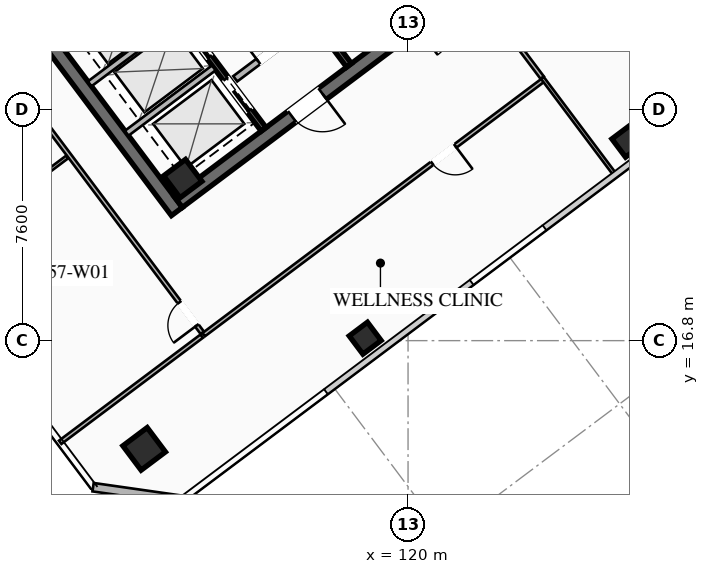
"""IFC4 building model, lengths in metres.
Left out: names, types, materials, properties, quantities, classifications, styles, units other than length and angle.
Written with IfcOpenShell. Run it as: python <this file> out.ifc"""

import sys

from ifc_helpers import new_model, si_unit, direction, frame, frame_2d, origin, origin_2d, place, context, subcontext, project, spatial, rectangle, hollow_rectangle, extrude, element, fill, save


model = new_model("IFC4")
c1 = context("Model", 3, precision=1e-05, world=origin(), true_north=direction((0.0, 1.0)))
c2 = subcontext(c1, "Body", "Model", "MODEL_VIEW")
j1 = project(units=[si_unit("LENGTHUNIT", "METRE"), si_unit("PLANEANGLEUNIT", "RADIAN")], contexts=[c1])
p1 = place(None, origin())
s1 = spatial("IfcSite", under=j1, at=p1, CompositionType="ELEMENT")
p2 = place(p1, origin())
s2 = spatial("IfcBuilding", under=s1, at=p2, CompositionType="ELEMENT")
p3 = place(p2, frame((0.0, 0.0, 211.3)))
s3 = spatial("IfcBuildingStorey", under=s2, at=p3, CompositionType="ELEMENT", Elevation=211.3)
p4 = place(p3, frame((112.396, 21.047, 0.0), z_axis=(0.0, 0.0, 1.0), x_axis=(-0.600005007985, 0.799996243986, 0.0)))
e1 = element("IfcWall", 1, at=p4, inside=s3, PredefinedType="SHEAR", context=c2, shape_type="SweptSolid", body=[
    extrude(rectangle(XDim=15.6, YDim=0.45, at=frame_2d((7.8, 0.0))), origin(), (0.0, 0.0, 1.0), 3.55),
])
p5 = place(p3, frame((124.649, 30.518, 0.0), z_axis=(0.0, 0.0, 1.0), x_axis=(-0.8, -0.6, 0.0)))
e2 = element("IfcWall", 2, at=p5, inside=s3, PredefinedType="SHEAR", context=c2, shape_type="SweptSolid", body=[
    extrude(rectangle(XDim=15.26, YDim=0.45, at=frame_2d((7.63, 0.0))), origin(), (0.0, 0.0, 1.0), 3.55),
])
p6 = place(p5, frame((9.33, 0.0, 0.0)))
e3 = element("IfcOpeningElement", 3, at=p6, cuts=e2, PredefinedType="OPENING", context=c2, shape_type="SweptSolid", body=[
    extrude(rectangle(XDim=1.25, YDim=2.25, at=frame_2d((0.625, 1.125))), frame((0.0, 0.235, 0.0), z_axis=(0.0, -1.0, 0.0), x_axis=(1.0, 0.0, 0.0)), (0.0, 0.0, 1.0), 0.47),
])
p7 = place(p5, frame((4.28, 0.0, 0.0)))
e4 = element("IfcOpeningElement", 4, at=p7, cuts=e2, PredefinedType="OPENING", context=c2, shape_type="SweptSolid", body=[
    extrude(rectangle(XDim=1.25, YDim=2.25, at=frame_2d((0.625, 1.125))), frame((0.0, 0.235, 0.0), z_axis=(0.0, -1.0, 0.0), x_axis=(1.0, 0.0, 0.0)), (0.0, 0.0, 1.0), 0.47),
])
p8 = place(p3, frame((112.59, 22.13, 0.0), z_axis=(0.0, 0.0, 1.0), x_axis=(0.799999996291, 0.600000004945, 0.0)))
e5 = element("IfcColumn", 5, at=p8, inside=s3, PredefinedType="COLUMN", context=c2, shape_type="SweptSolid", body=[
    extrude(hollow_rectangle(XDim=0.9, YDim=0.9, WallThickness=0.04, at=origin_2d()), origin(), (0.0, 0.0, 1.0), 3.37),
])
p9 = place(p3, frame((111.32, 13.24, 0.0), z_axis=(0.0, 0.0, 1.0), x_axis=(0.799999996291, 0.600000004945, 0.0)))
e6 = element("IfcColumn", 6, at=p9, inside=s3, PredefinedType="COLUMN", context=c2, shape_type="SweptSolid", body=[
    extrude(hollow_rectangle(XDim=1.0, YDim=1.0, WallThickness=0.04, at=origin_2d()), origin(), (0.0, 0.0, 1.0), 3.37),
])
for number, where, z_axis, x_axis in (
    (7, (118.59, 16.88, 0.0), (0.0, 0.0, 1.0), (0.8, 0.6, 0.0)),
    (8, (127.23, 23.36, 0.0), (0.0, 0.0, 1.0), (0.8, 0.6, 0.0)),
):
    element("IfcColumn", number, at=place(p3, frame(where, z_axis=z_axis, x_axis=x_axis)), inside=s3, PredefinedType="COLUMN", context=c2, shape_type="SweptSolid", body=[
        extrude(hollow_rectangle(XDim=0.75, YDim=0.75, WallThickness=0.032, at=origin_2d()), origin(), (0.0, 0.0, 1.0), 3.37),
    ])
p10 = place(p3, frame((112.58, 11.56, 0.0), z_axis=(0.0, 0.0, 1.0), x_axis=(-0.989954425158, 0.14138683146, 0.0)))
e9 = element("IfcWall", 9, at=p10, inside=s3, PredefinedType="SOLIDWALL", context=c2, shape_type="SweptSolid", body=[
    extrude(rectangle(XDim=2.97, YDim=0.28, at=frame_2d((1.485, 0.0))), origin(), (0.0, 0.0, 1.0), 3.37),
])
p11 = place(p3, frame((118.058, 25.856, 0.0), z_axis=(0.0, 0.0, 1.0), x_axis=(-0.600002657301, 0.799998007018, 0.0)))
e10 = element("IfcWall", 10, at=p11, inside=s3, PredefinedType="SHEAR", context=c2, shape_type="SweptSolid", body=[
    extrude(rectangle(XDim=14.7, YDim=0.2, at=frame_2d((7.35, 0.0))), origin(), (0.0, 0.0, 1.0), 3.37),
])
p12 = place(p3, frame((114.316, 25.412, 0.0), z_axis=(0.0, 0.0, 1.0), x_axis=(0.800018601094, 0.59997519774, 0.0)))
e11 = element("IfcWall", 11, at=p12, inside=s3, PredefinedType="SOLIDWALL", context=c2, shape_type="SweptSolid", body=[
    extrude(rectangle(XDim=3.15, YDim=0.22, at=frame_2d((1.575, 0.0))), origin(), (0.0, 0.0, 1.0), 2.723),
])
p13 = place(p12, frame((0.95, 0.0, 0.0)))
e12 = element("IfcOpeningElement", 12, at=p13, cuts=e11, PredefinedType="OPENING", context=c2, shape_type="SweptSolid", body=[
    extrude(rectangle(XDim=1.25, YDim=2.25, at=frame_2d((0.625, 1.125))), frame((0.0, 0.12, 0.0), z_axis=(0.0, -1.0, 0.0), x_axis=(1.0, 0.0, 0.0)), (0.0, 0.0, 1.0), 0.24),
])
p14 = place(p3, frame((115.25, 23.75, 0.0), z_axis=(0.0, 0.0, 1.0), x_axis=(-0.599994036198, 0.800004472816, 0.0)))
e13 = element("IfcWall", 13, at=p14, inside=s3, PredefinedType="SHEAR", context=c2, shape_type="SweptSolid", body=[
    extrude(rectangle(XDim=6.55, YDim=0.2, at=frame_2d((3.275, 0.0))), origin(), (0.0, 0.0, 1.0), 3.37),
])
p15 = place(p14, frame((4.975, 0.0, 0.0)))
e14 = element("IfcOpeningElement", 14, at=p15, cuts=e13, PredefinedType="OPENING", context=c2, shape_type="SweptSolid", body=[
    extrude(rectangle(XDim=1.3, YDim=2.25, at=frame_2d((0.65, 1.125))), frame((0.0, 0.11, 0.0), z_axis=(0.0, -1.0, 0.0), x_axis=(1.0, 0.0, 0.0)), (0.0, 0.0, 1.0), 0.22),
])
p16 = place(p14, frame((2.975, 0.0, 0.0)))
e15 = element("IfcOpeningElement", 15, at=p16, cuts=e13, PredefinedType="OPENING", context=c2, shape_type="SweptSolid", body=[
    extrude(rectangle(XDim=1.3, YDim=2.25, at=frame_2d((0.65, 1.125))), frame((0.0, 0.11, 0.0), z_axis=(0.0, -1.0, 0.0), x_axis=(1.0, 0.0, 0.0)), (0.0, 0.0, 1.0), 0.22),
])
p17 = place(p14, frame((0.775, 0.0, 0.0)))
e16 = element("IfcOpeningElement", 16, at=p17, cuts=e13, PredefinedType="OPENING", context=c2, shape_type="SweptSolid", body=[
    extrude(rectangle(XDim=1.3, YDim=2.25, at=frame_2d((0.65, 1.125))), frame((0.0, 0.11, 0.0), z_axis=(0.0, -1.0, 0.0), x_axis=(1.0, 0.0, 0.0)), (0.0, 0.0, 1.0), 0.22),
])
for number, where, z_axis, x_axis in (
    (17, (110.746, 23.622, 0.0), (0.0, 0.0, 1.0), (0.8, 0.6, 0.0)),
    (18, (109.528, 25.246, 0.0), (0.0, 0.0, 1.0), (0.8, 0.6, 0.0)),
):
    element("IfcWall", number, at=place(p3, frame(where, z_axis=z_axis, x_axis=x_axis)), inside=s3, PredefinedType="SOLIDWALL", context=c2, shape_type="SweptSolid", body=[
        extrude(rectangle(XDim=3.58, YDim=0.2, at=frame_2d((1.79, 0.0))), origin(), (0.0, 0.0, 1.0), 3.37),
    ])
p18 = place(p3, frame((124.462, 25.384, 0.0), z_axis=(0.0, 0.0, 1.0), x_axis=(-0.799997904343, -0.6000027942, 0.0)))
e19 = element("IfcWall", 19, at=p18, inside=s3, PredefinedType="PARTITIONING", context=c2, shape_type="SweptSolid", body=[
    extrude(rectangle(XDim=13.98, YDim=0.135, at=frame_2d((6.99, 0.0))), origin(), (0.0, 0.0, 1.0), 2.723),
])
p19 = place(p18, frame((3.635, 0.0, 0.0)))
e20 = element("IfcOpeningElement", 20, at=p19, cuts=e19, PredefinedType="OPENING", context=c2, shape_type="SweptSolid", body=[
    extrude(rectangle(XDim=0.95, YDim=2.05, at=frame_2d((0.475, 1.025))), frame((0.0, 0.077, 0.0), z_axis=(0.0, -1.0, 0.0), x_axis=(1.0, 0.0, 0.0)), (0.0, 0.0, 1.0), 0.155),
])
p20 = place(p3, frame((122.248, 28.336, 0.0), z_axis=(0.0, 0.0, 1.0), x_axis=(0.600010820699, -0.799991884361, 0.0)))
e21 = element("IfcWall", 21, at=p20, inside=s3, PredefinedType="PARTITIONING", context=c2, shape_type="SweptSolid", body=[
    extrude(rectangle(XDim=3.61, YDim=0.135, at=frame_2d((1.805, 0.0))), origin(), (0.0, 0.0, 1.0), 2.723),
])
p21 = place(p20, frame((0.25, 0.0, 0.0)))
e22 = element("IfcOpeningElement", 22, at=p21, cuts=e21, PredefinedType="OPENING", context=c2, shape_type="SweptSolid", body=[
    extrude(rectangle(XDim=0.95, YDim=2.05, at=frame_2d((0.475, 1.025))), frame((0.0, 0.077, 0.0), z_axis=(0.0, -1.0, 0.0), x_axis=(1.0, 0.0, 0.0)), (0.0, 0.0, 1.0), 0.155),
])
p22 = place(p3, frame((126.808, 22.256, 0.0), z_axis=(0.0, 0.0, 1.0), x_axis=(-0.600019580308, 0.799985314394, 0.0)))
e23 = element("IfcWall", 23, at=p22, inside=s3, PredefinedType="PARTITIONING", context=c2, shape_type="SweptSolid", body=[
    extrude(rectangle(XDim=3.99, YDim=0.11, at=frame_2d((1.995, 0.0))), origin(), (0.0, 0.0, 1.0), 2.723),
])
p23 = place(p3, frame((113.23, 17.06, 0.0), z_axis=(0.0, 0.0, 1.0), x_axis=(-0.600003772342, 0.79999717073, 0.0)))
e24 = element("IfcWall", 24, at=p23, inside=s3, PredefinedType="PARTITIONING", context=c2, shape_type="SweptSolid", body=[
    extrude(rectangle(XDim=20.71, YDim=0.135, at=frame_2d((10.355, 0.0))), origin(), (0.0, 0.0, 1.0), 2.723),
])
p24 = place(p23, frame((0.3, 0.0, 0.0)))
e25 = element("IfcOpeningElement", 25, at=p24, cuts=e24, PredefinedType="OPENING", context=c2, shape_type="SweptSolid", body=[
    extrude(rectangle(XDim=0.95, YDim=2.05, at=frame_2d((0.475, 1.025))), frame((0.0, 0.077, 0.0), z_axis=(0.0, -1.0, 0.0), x_axis=(1.0, 0.0, 0.0)), (0.0, 0.0, 1.0), 0.155),
])
p25 = place(p23, frame((11.272, 0.0, 0.0)))
e26 = element("IfcOpeningElement", 26, at=p25, cuts=e24, PredefinedType="OPENING", context=c2, shape_type="SweptSolid", body=[
    extrude(rectangle(XDim=0.95, YDim=2.05, at=frame_2d((0.475, 1.025))), frame((0.0, 0.077, 0.0), z_axis=(0.0, -1.0, 0.0), x_axis=(1.0, 0.0, 0.0)), (0.0, 0.0, 1.0), 0.155),
])
p26 = place(p23, frame((19.46, 0.0, 0.0)))
e27 = element("IfcOpeningElement", 27, at=p26, cuts=e24, PredefinedType="OPENING", context=c2, shape_type="SweptSolid", body=[
    extrude(rectangle(XDim=0.95, YDim=2.05, at=frame_2d((0.475, 1.025))), frame((0.0, 0.077, 0.0), z_axis=(0.0, -1.0, 0.0), x_axis=(1.0, 0.0, 0.0)), (0.0, 0.0, 1.0), 0.155),
])
p27 = place(p3, frame((108.558, 13.456, 0.0), z_axis=(0.0, 0.0, 1.0), x_axis=(0.800005033825, 0.599993288175, 0.0)))
e28 = element("IfcWall", 28, at=p27, inside=s3, PredefinedType="PARTITIONING", context=c2, shape_type="SweptSolid", body=[
    extrude(rectangle(XDim=5.82, YDim=0.135, at=frame_2d((2.91, 0.0))), origin(), (0.0, 0.0, 1.0), 2.723),
])
p28 = place(p3, frame((104.136, 19.352, 0.0), z_axis=(0.0, 0.0, 1.0), x_axis=(0.800005033825, 0.599993288175, 0.0)))
e29 = element("IfcWall", 29, at=p28, inside=s3, PredefinedType="PARTITIONING", context=c2, shape_type="SweptSolid", body=[
    extrude(rectangle(XDim=5.82, YDim=0.11, at=frame_2d((2.91, 0.0))), origin(), (0.0, 0.0, 1.0), 2.723),
])
p29 = place(p6, origin())
e30 = element("IfcDoor", 30, at=p29, inside=s3, OperationType="SINGLE_SWING_LEFT", PredefinedType="DOOR", context=c2, shape_type="SweptSolid", body=[
    extrude(rectangle(XDim=1.25, YDim=2.25, at=frame_2d((0.625, 1.125))), frame((0.0, 0.025, 0.0), z_axis=(0.0, -1.0, 0.0), x_axis=(1.0, 0.0, 0.0)), (0.0, 0.0, 1.0), 0.05),
])
fill(e3, e30)
p30 = place(p13, origin())
e31 = element("IfcDoor", 31, at=p30, inside=s3, OperationType="SINGLE_SWING_LEFT", PredefinedType="DOOR", context=c2, shape_type="SweptSolid", body=[
    extrude(rectangle(XDim=1.25, YDim=2.25, at=frame_2d((0.625, 1.125))), frame((0.0, 0.025, 0.0), z_axis=(0.0, -1.0, 0.0), x_axis=(1.0, 0.0, 0.0)), (0.0, 0.0, 1.0), 0.05),
])
fill(e12, e31)
p31 = place(p19, origin())
e32 = element("IfcDoor", 32, at=p31, inside=s3, OperationType="SINGLE_SWING_LEFT", PredefinedType="DOOR", context=c2, shape_type="SweptSolid", body=[
    extrude(rectangle(XDim=0.95, YDim=2.05, at=frame_2d((0.475, 1.025))), frame((0.0, 0.025, 0.0), z_axis=(0.0, -1.0, 0.0), x_axis=(1.0, 0.0, 0.0)), (0.0, 0.0, 1.0), 0.05),
])
fill(e20, e32)
p32 = place(p24, origin())
e33 = element("IfcDoor", 33, at=p32, inside=s3, OperationType="SINGLE_SWING_LEFT", PredefinedType="DOOR", context=c2, shape_type="SweptSolid", body=[
    extrude(rectangle(XDim=0.95, YDim=2.05, at=frame_2d((0.475, 1.025))), frame((0.0, 0.025, 0.0), z_axis=(0.0, -1.0, 0.0), x_axis=(1.0, 0.0, 0.0)), (0.0, 0.0, 1.0), 0.05),
])
fill(e25, e33)
p33 = place(p16, origin())
e34 = element("IfcDoor", 34, at=p33, inside=s3, OperationType="SLIDING_TO_LEFT", PredefinedType="DOOR", context=c2, shape_type="SweptSolid", body=[
    extrude(rectangle(XDim=1.3, YDim=2.25, at=frame_2d((0.65, 1.125))), frame((0.0, 0.025, 0.0), z_axis=(0.0, -1.0, 0.0), x_axis=(1.0, 0.0, 0.0)), (0.0, 0.0, 1.0), 0.05),
])
fill(e15, e34)
p34 = place(p17, origin())
e35 = element("IfcDoor", 35, at=p34, inside=s3, OperationType="SLIDING_TO_LEFT", PredefinedType="DOOR", context=c2, shape_type="SweptSolid", body=[
    extrude(rectangle(XDim=1.3, YDim=2.25, at=frame_2d((0.65, 1.125))), frame((0.0, 0.025, 0.0), z_axis=(0.0, -1.0, 0.0), x_axis=(1.0, 0.0, 0.0)), (0.0, 0.0, 1.0), 0.05),
])
fill(e16, e35)
save(model, sys.argv[1])
